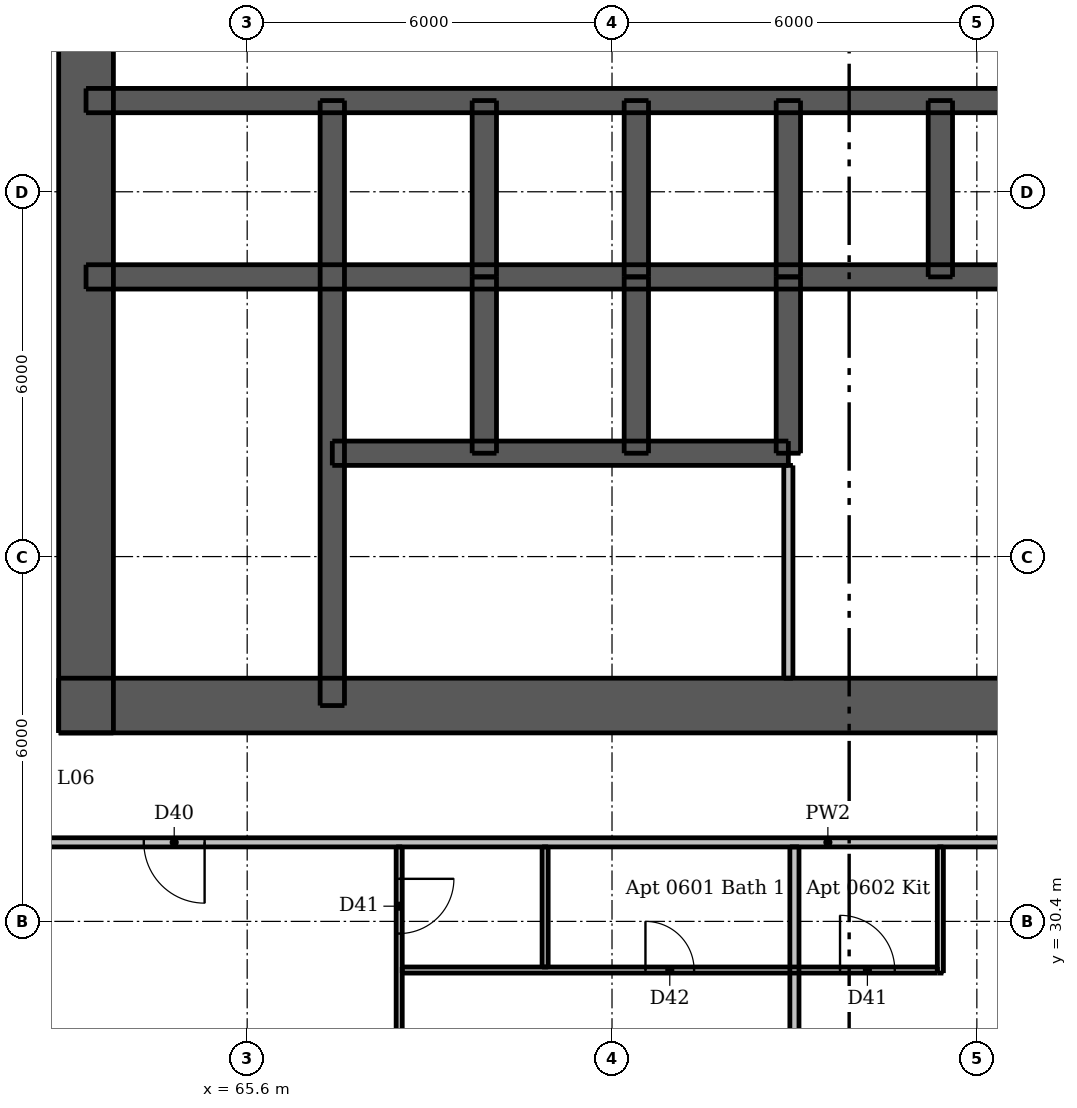
"""IFC4 building model, lengths in metres.
Left out: names, types, materials, properties, quantities, classifications, styles, units other than length and angle.
Written with IfcOpenShell. Run it as: python <this file> out.ifc"""

import sys

from ifc_helpers import new_model, si_unit, direction, frame, frame_2d, origin, place, context, subcontext, project, spatial, rectangle, extrude, element, fill, save


model = new_model("IFC4")
c1 = context("Model", 3, precision=1e-05, world=origin(), true_north=direction((0.0, 1.0)))
c2 = subcontext(c1, "Body", "Model", "MODEL_VIEW")
j1 = project(units=[si_unit("LENGTHUNIT", "METRE"), si_unit("PLANEANGLEUNIT", "RADIAN")], contexts=[c1])
p1 = place(None, origin())
s1 = spatial("IfcSite", under=j1, at=p1, CompositionType="ELEMENT")
p2 = place(p1, origin())
s2 = spatial("IfcBuilding", under=s1, at=p2, CompositionType="ELEMENT")
p3 = place(p2, frame((0.0, 0.0, 26.8)))
s3 = spatial("IfcBuildingStorey", under=s2, at=p3, CompositionType="ELEMENT", Elevation=26.8)
p4 = place(p3, frame((62.5, 33.95, 0.0), z_axis=(0.0, 0.0, 1.0), x_axis=(1.0, 0.0, 0.0)))
e1 = element("IfcWall", 1, at=p4, inside=s3, PredefinedType="SHEAR", context=c2, shape_type="SweptSolid", body=[
    extrude(rectangle(XDim=24.0, YDim=0.9, at=frame_2d((12.0, 0.0))), origin(), (0.0, 0.0, 1.0), 3.05),
])
p5 = place(p4, frame((2.05, 0.0, 0.0)))
e2 = element("IfcOpeningElement", 2, at=p5, cuts=e1, PredefinedType="OPENING", context=c2, shape_type="SweptSolid", body=[
    extrude(rectangle(XDim=1.1, YDim=2.1, at=frame_2d((0.55, 1.05))), frame((0.0, 0.46, 0.0), z_axis=(0.0, -1.0, 0.0), x_axis=(1.0, 0.0, 0.0)), (0.0, 0.0, 1.0), 0.92),
])
p6 = place(p4, frame((20.85, 0.0, 0.0)))
e3 = element("IfcOpeningElement", 3, at=p6, cuts=e1, PredefinedType="OPENING", context=c2, shape_type="SweptSolid", body=[
    extrude(rectangle(XDim=1.1, YDim=2.1, at=frame_2d((0.55, 1.05))), frame((0.0, 0.46, 0.0), z_axis=(0.0, -1.0, 0.0), x_axis=(1.0, 0.0, 0.0)), (0.0, 0.0, 1.0), 0.92),
])
p7 = place(p4, frame((8.0, 0.0, 0.0)))
e4 = element("IfcOpeningElement", 4, at=p7, cuts=e1, PredefinedType="OPENING", context=c2, shape_type="SweptSolid", body=[
    extrude(rectangle(XDim=1.1, YDim=2.1, at=frame_2d((0.55, 1.05))), frame((0.0, 0.46, 0.0), z_axis=(0.0, -1.0, 0.0), x_axis=(1.0, 0.0, 0.0)), (0.0, 0.0, 1.0), 0.92),
])
p8 = place(p4, frame((15.3, 0.0, 0.0)))
e5 = element("IfcOpeningElement", 5, at=p8, cuts=e1, PredefinedType="OPENING", context=c2, shape_type="SweptSolid", body=[
    extrude(rectangle(XDim=0.9, YDim=2.1, at=frame_2d((0.45, 1.05))), frame((0.0, 0.46, 0.0), z_axis=(0.0, -1.0, 0.0), x_axis=(1.0, 0.0, 0.0)), (0.0, 0.0, 1.0), 0.92),
])
p9 = place(p3, frame((62.95, 33.5, 0.0), z_axis=(0.0, 0.0, 1.0), x_axis=(0.0, 1.0, 0.0)))
e6 = element("IfcWall", 6, at=p9, inside=s3, PredefinedType="SHEAR", context=c2, shape_type="SweptSolid", body=[
    extrude(rectangle(XDim=24.0, YDim=0.9, at=frame_2d((12.0, 0.0))), origin(), (0.0, 0.0, 1.0), 3.05),
])
p10 = place(p9, frame((11.2, 0.0, 0.0)))
e7 = element("IfcOpeningElement", 7, at=p10, cuts=e6, PredefinedType="OPENING", context=c2, shape_type="SweptSolid", body=[
    extrude(rectangle(XDim=1.6, YDim=2.1, at=frame_2d((0.8, 1.05))), frame((0.0, 0.46, 0.0), z_axis=(0.0, -1.0, 0.0), x_axis=(1.0, 0.0, 0.0)), (0.0, 0.0, 1.0), 0.92),
])
p11 = place(p3, frame((62.95, 41.0, 0.0), z_axis=(0.0, 0.0, 1.0), x_axis=(1.0, 0.0, 0.0)))
e8 = element("IfcWall", 8, at=p11, inside=s3, PredefinedType="SHEAR", context=c2, shape_type="SweptSolid", body=[
    extrude(rectangle(XDim=23.1, YDim=0.4, at=frame_2d((11.55, 0.0))), origin(), (0.0, 0.0, 1.0), 3.05),
])
p12 = place(p3, frame((62.95, 43.9, 0.0), z_axis=(0.0, 0.0, 1.0), x_axis=(1.0, 0.0, 0.0)))
e9 = element("IfcWall", 9, at=p12, inside=s3, PredefinedType="SHEAR", context=c2, shape_type="SweptSolid", body=[
    extrude(rectangle(XDim=23.1, YDim=0.4, at=frame_2d((11.55, 0.0))), origin(), (0.0, 0.0, 1.0), 3.05),
])
p13 = place(p12, frame((1.7, 0.0, 0.0)))
e10 = element("IfcOpeningElement", 10, at=p13, cuts=e9, PredefinedType="OPENING", context=c2, shape_type="SweptSolid", body=[
    extrude(rectangle(XDim=0.9, YDim=2.1, at=frame_2d((0.45, 1.05))), frame((0.0, 0.21, 0.0), z_axis=(0.0, -1.0, 0.0), x_axis=(1.0, 0.0, 0.0)), (0.0, 0.0, 1.0), 0.42),
])
p14 = place(p12, frame((20.5, 0.0, 0.0)))
e11 = element("IfcOpeningElement", 11, at=p14, cuts=e9, PredefinedType="OPENING", context=c2, shape_type="SweptSolid", body=[
    extrude(rectangle(XDim=0.9, YDim=2.1, at=frame_2d((0.45, 1.05))), frame((0.0, 0.21, 0.0), z_axis=(0.0, -1.0, 0.0), x_axis=(1.0, 0.0, 0.0)), (0.0, 0.0, 1.0), 0.42),
])
p15 = place(p12, frame((4.75, 0.0, 0.0)))
e12 = element("IfcOpeningElement", 12, at=p15, cuts=e9, PredefinedType="OPENING", context=c2, shape_type="SweptSolid", body=[
    extrude(rectangle(XDim=1.1, YDim=2.1, at=frame_2d((0.55, 1.05))), frame((0.0, 0.21, 0.0), z_axis=(0.0, -1.0, 0.0), x_axis=(1.0, 0.0, 0.0)), (0.0, 0.0, 1.0), 0.42),
])
p16 = place(p12, frame((7.25, 0.0, 0.0)))
e13 = element("IfcOpeningElement", 13, at=p16, cuts=e9, PredefinedType="OPENING", context=c2, shape_type="SweptSolid", body=[
    extrude(rectangle(XDim=1.1, YDim=2.1, at=frame_2d((0.55, 1.05))), frame((0.0, 0.21, 0.0), z_axis=(0.0, -1.0, 0.0), x_axis=(1.0, 0.0, 0.0)), (0.0, 0.0, 1.0), 0.42),
])
p17 = place(p12, frame((9.75, 0.0, 0.0)))
e14 = element("IfcOpeningElement", 14, at=p17, cuts=e9, PredefinedType="OPENING", context=c2, shape_type="SweptSolid", body=[
    extrude(rectangle(XDim=1.1, YDim=2.1, at=frame_2d((0.55, 1.05))), frame((0.0, 0.21, 0.0), z_axis=(0.0, -1.0, 0.0), x_axis=(1.0, 0.0, 0.0)), (0.0, 0.0, 1.0), 0.42),
])
p18 = place(p12, frame((12.25, 0.0, 0.0)))
e15 = element("IfcOpeningElement", 15, at=p18, cuts=e9, PredefinedType="OPENING", context=c2, shape_type="SweptSolid", body=[
    extrude(rectangle(XDim=1.1, YDim=2.1, at=frame_2d((0.55, 1.05))), frame((0.0, 0.21, 0.0), z_axis=(0.0, -1.0, 0.0), x_axis=(1.0, 0.0, 0.0)), (0.0, 0.0, 1.0), 0.42),
])
p19 = place(p12, frame((14.75, 0.0, 0.0)))
e16 = element("IfcOpeningElement", 16, at=p19, cuts=e9, PredefinedType="OPENING", context=c2, shape_type="SweptSolid", body=[
    extrude(rectangle(XDim=1.1, YDim=2.1, at=frame_2d((0.55, 1.05))), frame((0.0, 0.21, 0.0), z_axis=(0.0, -1.0, 0.0), x_axis=(1.0, 0.0, 0.0)), (0.0, 0.0, 1.0), 0.42),
])
p20 = place(p12, frame((17.25, 0.0, 0.0)))
e17 = element("IfcOpeningElement", 17, at=p20, cuts=e9, PredefinedType="OPENING", context=c2, shape_type="SweptSolid", body=[
    extrude(rectangle(XDim=1.1, YDim=2.1, at=frame_2d((0.55, 1.05))), frame((0.0, 0.21, 0.0), z_axis=(0.0, -1.0, 0.0), x_axis=(1.0, 0.0, 0.0)), (0.0, 0.0, 1.0), 0.42),
])
p21 = place(p3, frame((67.0, 33.95, 0.0), z_axis=(0.0, 0.0, 1.0), x_axis=(0.0, 1.0, 0.0)))
e18 = element("IfcWall", 18, at=p21, inside=s3, PredefinedType="SHEAR", context=c2, shape_type="SweptSolid", body=[
    extrude(rectangle(XDim=9.95, YDim=0.4, at=frame_2d((4.975, 0.0))), origin(), (0.0, 0.0, 1.0), 3.05),
])
p22 = place(p21, frame((0.65, 0.0, 0.0)))
e19 = element("IfcOpeningElement", 19, at=p22, cuts=e18, PredefinedType="OPENING", context=c2, shape_type="SweptSolid", body=[
    extrude(rectangle(XDim=1.1, YDim=2.1, at=frame_2d((0.55, 1.05))), frame((0.0, 0.21, 0.0), z_axis=(0.0, -1.0, 0.0), x_axis=(1.0, 0.0, 0.0)), (0.0, 0.0, 1.0), 0.42),
])
for number, where, z_axis, x_axis in (
    (20, (69.5, 41.0, 0.0), (0.0, 0.0, 1.0), (0.0, 1.0, 0.0)),
    (21, (72.0, 41.0, 0.0), (0.0, 0.0, 1.0), (0.0, 1.0, 0.0)),
    (22, (74.5, 41.0, 0.0), (0.0, 0.0, 1.0), (0.0, 1.0, 0.0)),
    (23, (77.0, 41.0, 0.0), (0.0, 0.0, 1.0), (0.0, 1.0, 0.0)),
):
    element("IfcWall", number, at=place(p3, frame(where, z_axis=z_axis, x_axis=x_axis)), inside=s3, PredefinedType="SHEAR", context=c2, shape_type="SweptSolid", body=[
        extrude(rectangle(XDim=2.9, YDim=0.4, at=frame_2d((1.45, 0.0))), origin(), (0.0, 0.0, 1.0), 3.05),
    ])
p23 = place(p3, frame((67.0, 38.1, 0.0), z_axis=(0.0, 0.0, 1.0), x_axis=(1.0, 0.0, 0.0)))
e24 = element("IfcWall", 24, at=p23, inside=s3, PredefinedType="SHEAR", context=c2, shape_type="SweptSolid", body=[
    extrude(rectangle(XDim=7.5, YDim=0.4, at=frame_2d((3.75, 0.0))), origin(), (0.0, 0.0, 1.0), 3.05),
])
p24 = place(p23, frame((0.7, 0.0, 0.0)))
e25 = element("IfcOpeningElement", 25, at=p24, cuts=e24, PredefinedType="OPENING", context=c2, shape_type="SweptSolid", body=[
    extrude(rectangle(XDim=1.1, YDim=2.1, at=frame_2d((0.55, 1.05))), frame((0.0, 0.21, 0.0), z_axis=(0.0, -1.0, 0.0), x_axis=(1.0, 0.0, 0.0)), (0.0, 0.0, 1.0), 0.42),
])
p25 = place(p23, frame((3.2, 0.0, 0.0)))
e26 = element("IfcOpeningElement", 26, at=p25, cuts=e24, PredefinedType="OPENING", context=c2, shape_type="SweptSolid", body=[
    extrude(rectangle(XDim=1.1, YDim=2.1, at=frame_2d((0.55, 1.05))), frame((0.0, 0.21, 0.0), z_axis=(0.0, -1.0, 0.0), x_axis=(1.0, 0.0, 0.0)), (0.0, 0.0, 1.0), 0.42),
])
p26 = place(p23, frame((5.65, 0.0, 0.0)))
e27 = element("IfcOpeningElement", 27, at=p26, cuts=e24, PredefinedType="OPENING", context=c2, shape_type="SweptSolid", body=[
    extrude(rectangle(XDim=1.2, YDim=2.1, at=frame_2d((0.6, 1.05))), frame((0.0, 0.21, 0.0), z_axis=(0.0, -1.0, 0.0), x_axis=(1.0, 0.0, 0.0)), (0.0, 0.0, 1.0), 0.42),
])
for number, where, z_axis, x_axis in (
    (28, (69.5, 38.1, 0.0), (0.0, 0.0, 1.0), (0.0, 1.0, 0.0)),
    (29, (72.0, 38.1, 0.0), (0.0, 0.0, 1.0), (0.0, 1.0, 0.0)),
    (30, (74.5, 38.1, 0.0), (0.0, 0.0, 1.0), (0.0, 1.0, 0.0)),
):
    element("IfcWall", number, at=place(p3, frame(where, z_axis=z_axis, x_axis=x_axis)), inside=s3, PredefinedType="SHEAR", context=c2, shape_type="SweptSolid", body=[
        extrude(rectangle(XDim=2.9, YDim=0.4, at=frame_2d((1.45, 0.0))), origin(), (0.0, 0.0, 1.0), 3.05),
    ])
p27 = place(p3, frame((74.5, 34.4, 0.0), z_axis=(0.0, 0.0, 1.0), x_axis=(0.0, 1.0, 0.0)))
e31 = element("IfcWall", 31, at=p27, inside=s3, PredefinedType="PLUMBINGWALL", context=c2, shape_type="SweptSolid", body=[
    extrude(rectangle(XDim=3.5, YDim=0.15, at=frame_2d((1.75, 0.0))), origin(), (0.0, 0.0, 1.0), 3.05),
])
p28 = place(p3, frame((68.1, 31.625, 0.0), z_axis=(0.0, 0.0, 1.0), x_axis=(0.0, -1.0, 0.0)))
e32 = element("IfcWall", 32, at=p28, inside=s3, PredefinedType="PARTITIONING", context=c2, shape_type="SweptSolid", body=[
    extrude(rectangle(XDim=10.125, YDim=0.1, at=frame_2d((5.062, 0.0))), origin(), (0.0, 0.0, 1.0), 3.05),
])
p29 = place(p28, frame((0.525, 0.0, 0.0)))
e33 = element("IfcOpeningElement", 33, at=p29, cuts=e32, PredefinedType="OPENING", context=c2, shape_type="SweptSolid", body=[
    extrude(rectangle(XDim=0.9, YDim=2.1, at=frame_2d((0.45, 1.05))), frame((0.0, 0.06, 0.0), z_axis=(0.0, -1.0, 0.0), x_axis=(1.0, 0.0, 0.0)), (0.0, 0.0, 1.0), 0.12),
])
p30 = place(p28, frame((5.625, 0.0, 0.0)))
e34 = element("IfcOpeningElement", 34, at=p30, cuts=e32, PredefinedType="OPENING", context=c2, shape_type="SweptSolid", body=[
    extrude(rectangle(XDim=0.9, YDim=2.1, at=frame_2d((0.45, 1.05))), frame((0.0, 0.06, 0.0), z_axis=(0.0, -1.0, 0.0), x_axis=(1.0, 0.0, 0.0)), (0.0, 0.0, 1.0), 0.12),
])
p31 = place(p3, frame((70.5, 29.65, 0.0), z_axis=(0.0, 0.0, 1.0), x_axis=(0.0, 1.0, 0.0)))
e35 = element("IfcWall", 35, at=p31, inside=s3, PredefinedType="PARTITIONING", context=c2, shape_type="SweptSolid", body=[
    extrude(rectangle(XDim=1.975, YDim=0.1, at=frame_2d((0.988, 0.0))), origin(), (0.0, 0.0, 1.0), 3.05),
])
p32 = place(p3, frame((77.0, 29.55, 0.0), z_axis=(0.0, 0.0, 1.0), x_axis=(0.0, 1.0, 0.0)))
e36 = element("IfcWall", 36, at=p32, inside=s3, PredefinedType="PARTITIONING", context=c2, shape_type="SweptSolid", body=[
    extrude(rectangle(XDim=2.075, YDim=0.1, at=frame_2d((1.038, 0.0))), origin(), (0.0, 0.0, 1.0), 3.05),
])
p33 = place(p3, frame((68.15, 29.6, 0.0), z_axis=(0.0, 0.0, 1.0), x_axis=(1.0, 0.0, 0.0)))
e37 = element("IfcWall", 37, at=p33, inside=s3, PredefinedType="PARTITIONING", context=c2, shape_type="SweptSolid", body=[
    extrude(rectangle(XDim=8.8, YDim=0.1, at=frame_2d((4.4, 0.0))), origin(), (0.0, 0.0, 1.0), 3.05),
])
p34 = place(p33, frame((4.0, 0.0, 0.0)))
e38 = element("IfcOpeningElement", 38, at=p34, cuts=e37, PredefinedType="OPENING", context=c2, shape_type="SweptSolid", body=[
    extrude(rectangle(XDim=0.8, YDim=2.1, at=frame_2d((0.4, 1.05))), frame((0.0, 0.06, 0.0), z_axis=(0.0, -1.0, 0.0), x_axis=(1.0, 0.0, 0.0)), (0.0, 0.0, 1.0), 0.12),
])
p35 = place(p33, frame((7.2, 0.0, 0.0)))
e39 = element("IfcOpeningElement", 39, at=p35, cuts=e37, PredefinedType="OPENING", context=c2, shape_type="SweptSolid", body=[
    extrude(rectangle(XDim=0.9, YDim=2.1, at=frame_2d((0.45, 1.05))), frame((0.0, 0.06, 0.0), z_axis=(0.0, -1.0, 0.0), x_axis=(1.0, 0.0, 0.0)), (0.0, 0.0, 1.0), 0.12),
])
p36 = place(p3, frame((74.6, 21.5, 0.0), z_axis=(0.0, 0.0, 1.0), x_axis=(0.0, 1.0, 0.0)))
e40 = element("IfcWall", 40, at=p36, inside=s3, PredefinedType="PARTITIONING", context=c2, shape_type="SweptSolid", body=[
    extrude(rectangle(XDim=10.125, YDim=0.15, at=frame_2d((5.062, 0.0))), origin(), (0.0, 0.0, 1.0), 3.05),
])
p37 = place(p3, frame((89.525, 31.7, 0.0), z_axis=(0.0, 0.0, 1.0), x_axis=(-1.0, 0.0, 0.0)))
e41 = element("IfcWall", 41, at=p37, inside=s3, PredefinedType="PARTITIONING", context=c2, shape_type="SweptSolid", body=[
    extrude(rectangle(XDim=28.75, YDim=0.15, at=frame_2d((14.375, 0.0))), origin(), (0.0, 0.0, 1.0), 3.05),
])
p38 = place(p37, frame((24.625, 0.0, 0.0)))
e42 = element("IfcOpeningElement", 42, at=p38, cuts=e41, PredefinedType="OPENING", context=c2, shape_type="SweptSolid", body=[
    extrude(rectangle(XDim=1.0, YDim=2.1, at=frame_2d((0.5, 1.05))), frame((0.0, 0.085, 0.0), z_axis=(0.0, -1.0, 0.0), x_axis=(1.0, 0.0, 0.0)), (0.0, 0.0, 1.0), 0.17),
])
p39 = place(p37, frame((10.225, 0.0, 0.0)))
e43 = element("IfcOpeningElement", 43, at=p39, cuts=e41, PredefinedType="OPENING", context=c2, shape_type="SweptSolid", body=[
    extrude(rectangle(XDim=1.0, YDim=2.1, at=frame_2d((0.5, 1.05))), frame((0.0, 0.085, 0.0), z_axis=(0.0, -1.0, 0.0), x_axis=(1.0, 0.0, 0.0)), (0.0, 0.0, 1.0), 0.17),
])
p40 = place(p37, frame((2.425, 0.0, 0.0)))
e44 = element("IfcOpeningElement", 44, at=p40, cuts=e41, PredefinedType="OPENING", context=c2, shape_type="SweptSolid", body=[
    extrude(rectangle(XDim=1.0, YDim=2.1, at=frame_2d((0.5, 1.05))), frame((0.0, 0.085, 0.0), z_axis=(0.0, -1.0, 0.0), x_axis=(1.0, 0.0, 0.0)), (0.0, 0.0, 1.0), 0.17),
])
p41 = place(p5, origin())
e45 = element("IfcDoor", 45, at=p41, inside=s3, OperationType="SINGLE_SWING_LEFT", PredefinedType="DOOR", context=c2, shape_type="SweptSolid", body=[
    extrude(rectangle(XDim=1.1, YDim=2.1, at=frame_2d((0.55, 1.05))), frame((0.0, 0.438, 0.0), z_axis=(0.0, -1.0, 0.0), x_axis=(1.0, 0.0, 0.0)), (0.0, 0.0, 1.0), 0.05),
])
fill(e2, e45)
p42 = place(p7, origin())
e46 = element("IfcDoor", 46, at=p42, inside=s3, OperationType="SINGLE_SWING_LEFT", PredefinedType="DOOR", context=c2, shape_type="SweptSolid", body=[
    extrude(rectangle(XDim=1.1, YDim=2.1, at=frame_2d((0.55, 1.05))), frame((0.0, 0.438, 0.0), z_axis=(0.0, -1.0, 0.0), x_axis=(1.0, 0.0, 0.0)), (0.0, 0.0, 1.0), 0.05),
])
fill(e4, e46)
p43 = place(p22, origin())
e47 = element("IfcDoor", 47, at=p43, inside=s3, OperationType="SINGLE_SWING_RIGHT", PredefinedType="DOOR", context=c2, shape_type="SweptSolid", body=[
    extrude(rectangle(XDim=1.1, YDim=2.1, at=frame_2d((0.55, 1.05))), frame((0.0, -0.138, 0.0), z_axis=(0.0, -1.0, 0.0), x_axis=(1.0, 0.0, 0.0)), (0.0, 0.0, 1.0), 0.05),
])
fill(e19, e47)
p44 = place(p8, origin())
e48 = element("IfcDoor", 48, at=p44, inside=s3, OperationType="SINGLE_SWING_LEFT", PredefinedType="DOOR", context=c2, shape_type="SweptSolid", body=[
    extrude(rectangle(XDim=0.9, YDim=2.1, at=frame_2d((0.45, 1.05))), frame((0.0, 0.438, 0.0), z_axis=(0.0, -1.0, 0.0), x_axis=(1.0, 0.0, 0.0)), (0.0, 0.0, 1.0), 0.05),
])
fill(e5, e48)
p45 = place(p13, origin())
e49 = element("IfcDoor", 49, at=p45, inside=s3, OperationType="SINGLE_SWING_LEFT", PredefinedType="DOOR", context=c2, shape_type="SweptSolid", body=[
    extrude(rectangle(XDim=0.9, YDim=2.1, at=frame_2d((0.45, 1.05))), frame((0.0, -0.138, 0.0), z_axis=(0.0, -1.0, 0.0), x_axis=(1.0, 0.0, 0.0)), (0.0, 0.0, 1.0), 0.05),
])
fill(e10, e49)
p46 = place(p15, origin())
e50 = element("IfcDoor", 50, at=p46, inside=s3, OperationType="DOUBLE_DOOR_SLIDING", PredefinedType="DOOR", context=c2, shape_type="SweptSolid", body=[
    extrude(rectangle(XDim=1.1, YDim=2.1, at=frame_2d((0.55, 1.05))), frame((0.0, 0.025, 0.0), z_axis=(0.0, -1.0, 0.0), x_axis=(1.0, 0.0, 0.0)), (0.0, 0.0, 1.0), 0.05),
])
fill(e12, e50)
p47 = place(p16, origin())
e51 = element("IfcDoor", 51, at=p47, inside=s3, OperationType="DOUBLE_DOOR_SLIDING", PredefinedType="DOOR", context=c2, shape_type="SweptSolid", body=[
    extrude(rectangle(XDim=1.1, YDim=2.1, at=frame_2d((0.55, 1.05))), frame((0.0, 0.025, 0.0), z_axis=(0.0, -1.0, 0.0), x_axis=(1.0, 0.0, 0.0)), (0.0, 0.0, 1.0), 0.05),
])
fill(e13, e51)
p48 = place(p17, origin())
e52 = element("IfcDoor", 52, at=p48, inside=s3, OperationType="DOUBLE_DOOR_SLIDING", PredefinedType="DOOR", context=c2, shape_type="SweptSolid", body=[
    extrude(rectangle(XDim=1.1, YDim=2.1, at=frame_2d((0.55, 1.05))), frame((0.0, 0.025, 0.0), z_axis=(0.0, -1.0, 0.0), x_axis=(1.0, 0.0, 0.0)), (0.0, 0.0, 1.0), 0.05),
])
fill(e14, e52)
p49 = place(p18, origin())
e53 = element("IfcDoor", 53, at=p49, inside=s3, OperationType="DOUBLE_DOOR_SLIDING", PredefinedType="DOOR", context=c2, shape_type="SweptSolid", body=[
    extrude(rectangle(XDim=1.1, YDim=2.1, at=frame_2d((0.55, 1.05))), frame((0.0, 0.025, 0.0), z_axis=(0.0, -1.0, 0.0), x_axis=(1.0, 0.0, 0.0)), (0.0, 0.0, 1.0), 0.05),
])
fill(e15, e53)
p50 = place(p19, origin())
e54 = element("IfcDoor", 54, at=p50, inside=s3, OperationType="DOUBLE_DOOR_SLIDING", PredefinedType="DOOR", context=c2, shape_type="SweptSolid", body=[
    extrude(rectangle(XDim=1.1, YDim=2.1, at=frame_2d((0.55, 1.05))), frame((0.0, 0.025, 0.0), z_axis=(0.0, -1.0, 0.0), x_axis=(1.0, 0.0, 0.0)), (0.0, 0.0, 1.0), 0.05),
])
fill(e16, e54)
p51 = place(p24, origin())
e55 = element("IfcDoor", 55, at=p51, inside=s3, OperationType="DOUBLE_DOOR_SLIDING", PredefinedType="DOOR", context=c2, shape_type="SweptSolid", body=[
    extrude(rectangle(XDim=1.1, YDim=2.1, at=frame_2d((0.55, 1.05))), frame((0.0, 0.025, 0.0), z_axis=(0.0, -1.0, 0.0), x_axis=(1.0, 0.0, 0.0)), (0.0, 0.0, 1.0), 0.05),
])
fill(e25, e55)
p52 = place(p25, origin())
e56 = element("IfcDoor", 56, at=p52, inside=s3, OperationType="DOUBLE_DOOR_SLIDING", PredefinedType="DOOR", context=c2, shape_type="SweptSolid", body=[
    extrude(rectangle(XDim=1.1, YDim=2.1, at=frame_2d((0.55, 1.05))), frame((0.0, 0.025, 0.0), z_axis=(0.0, -1.0, 0.0), x_axis=(1.0, 0.0, 0.0)), (0.0, 0.0, 1.0), 0.05),
])
fill(e26, e56)
p53 = place(p26, origin())
e57 = element("IfcDoor", 57, at=p53, inside=s3, OperationType="DOUBLE_DOOR_SLIDING", PredefinedType="DOOR", context=c2, shape_type="SweptSolid", body=[
    extrude(rectangle(XDim=1.2, YDim=2.1, at=frame_2d((0.6, 1.05))), frame((0.0, 0.025, 0.0), z_axis=(0.0, -1.0, 0.0), x_axis=(1.0, 0.0, 0.0)), (0.0, 0.0, 1.0), 0.05),
])
fill(e27, e57)
p54 = place(p38, origin())
e58 = element("IfcDoor", 58, at=p54, inside=s3, OperationType="SINGLE_SWING_LEFT", PredefinedType="DOOR", context=c2, shape_type="SweptSolid", body=[
    extrude(rectangle(XDim=1.0, YDim=2.1, at=frame_2d((0.5, 1.05))), frame((0.0, 0.025, 0.0), z_axis=(0.0, -1.0, 0.0), x_axis=(1.0, 0.0, 0.0)), (0.0, 0.0, 1.0), 0.05),
])
fill(e42, e58)
p55 = place(p29, origin())
e59 = element("IfcDoor", 59, at=p55, inside=s3, OperationType="SINGLE_SWING_LEFT", PredefinedType="DOOR", context=c2, shape_type="SweptSolid", body=[
    extrude(rectangle(XDim=0.9, YDim=2.1, at=frame_2d((0.45, 1.05))), frame((0.0, 0.025, 0.0), z_axis=(0.0, -1.0, 0.0), x_axis=(1.0, 0.0, 0.0)), (0.0, 0.0, 1.0), 0.05),
])
fill(e33, e59)
p56 = place(p34, origin())
e60 = element("IfcDoor", 60, at=p56, inside=s3, OperationType="SINGLE_SWING_LEFT", PredefinedType="DOOR", context=c2, shape_type="SweptSolid", body=[
    extrude(rectangle(XDim=0.8, YDim=2.1, at=frame_2d((0.4, 1.05))), frame((0.0, 0.025, 0.0), z_axis=(0.0, -1.0, 0.0), x_axis=(1.0, 0.0, 0.0)), (0.0, 0.0, 1.0), 0.05),
])
fill(e38, e60)
p57 = place(p35, origin())
e61 = element("IfcDoor", 61, at=p57, inside=s3, OperationType="SINGLE_SWING_LEFT", PredefinedType="DOOR", context=c2, shape_type="SweptSolid", body=[
    extrude(rectangle(XDim=0.9, YDim=2.1, at=frame_2d((0.45, 1.05))), frame((0.0, 0.025, 0.0), z_axis=(0.0, -1.0, 0.0), x_axis=(1.0, 0.0, 0.0)), (0.0, 0.0, 1.0), 0.05),
])
fill(e39, e61)
save(model, sys.argv[1])
